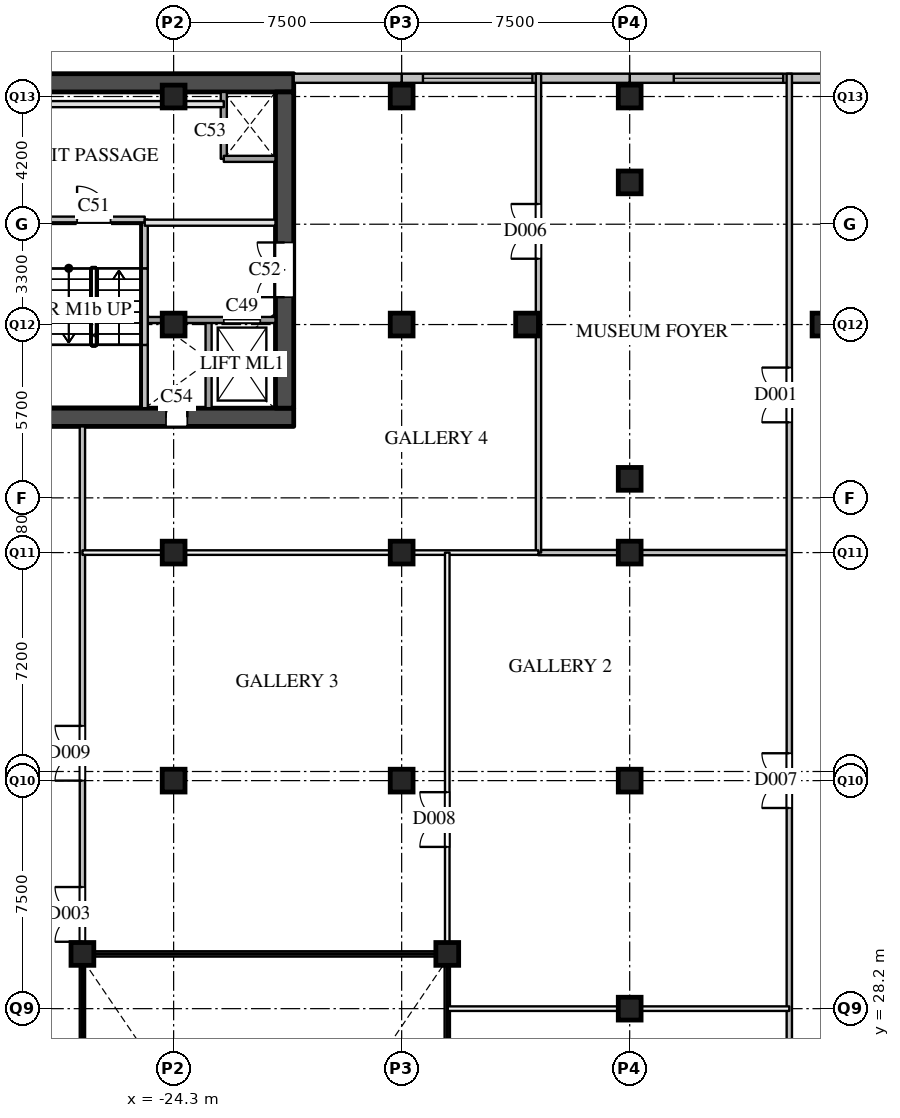
"""IFC4 building model, lengths in metres.
Left out: names, types, materials, properties, quantities, classifications, styles, units other than length and angle.
Written with IfcOpenShell. Run it as: python <this file> out.ifc"""

import sys

from ifc_helpers import new_model, si_unit, direction, frame, frame_2d, origin, origin_2d, place, context, subcontext, project, spatial, rectangle, extrude, element, fill, save


model = new_model("IFC4")
c1 = context("Model", 3, precision=1e-05, world=origin(), true_north=direction((0.0, 1.0)))
c2 = subcontext(c1, "Body", "Model", "MODEL_VIEW")
j1 = project(units=[si_unit("LENGTHUNIT", "METRE"), si_unit("PLANEANGLEUNIT", "RADIAN")], contexts=[c1])
p1 = place(None, origin())
s1 = spatial("IfcSite", under=j1, at=p1, CompositionType="ELEMENT")
p2 = place(p1, origin())
s2 = spatial("IfcBuilding", under=s1, at=p2, CompositionType="ELEMENT")
p3 = place(p2, origin())
s3 = spatial("IfcBuildingStorey", under=s2, at=p3, CompositionType="ELEMENT", Elevation=0.0)
for number, where, z_axis, x_axis in (
    (1, (-24.3, 35.7, 0.0), (0.0, 0.0, 1.0), (1.0, 0.0, 0.0)),
    (2, (-24.3, 43.2, 0.0), (0.0, 0.0, 1.0), (1.0, 0.0, 0.0)),
    (3, (-24.3, 50.7, 0.0), (0.0, 0.0, 1.0), (1.0, 0.0, 0.0)),
    (4, (-24.3, 58.2, 0.0), (0.0, 0.0, 1.0), (1.0, 0.0, 0.0)),
    (5, (-16.8, 35.7, 0.0), (0.0, 0.0, 1.0), (1.0, 0.0, 0.0)),
    (6, (-16.8, 43.2, 0.0), (0.0, 0.0, 1.0), (1.0, 0.0, 0.0)),
    (7, (-16.8, 50.7, 0.0), (0.0, 0.0, 1.0), (1.0, 0.0, 0.0)),
    (8, (-16.8, 58.2, 0.0), (0.0, 0.0, 1.0), (1.0, 0.0, 0.0)),
    (9, (-9.3, 28.2, 0.0), (0.0, 0.0, 1.0), (1.0, 0.0, 0.0)),
    (10, (-9.3, 35.7, 0.0), (0.0, 0.0, 1.0), (1.0, 0.0, 0.0)),
    (11, (-9.3, 43.2, 0.0), (0.0, 0.0, 1.0), (1.0, 0.0, 0.0)),
    (12, (-9.3, 58.2, 0.0), (0.0, 0.0, 1.0), (1.0, 0.0, 0.0)),
    (13, (-15.3, 30.0, 0.0), (0.0, 0.0, 1.0), (1.0, 0.0, 0.0)),
    (14, (-27.3, 30.0, 0.0), (0.0, 0.0, 1.0), (1.0, 0.0, 0.0)),
    (15, (-12.675, 50.7, 0.0), (0.0, 0.0, 1.0), (1.0, 0.0, 0.0)),
    (16, (-9.3, 45.625, 0.0), (0.0, 0.0, 1.0), (1.0, 0.0, 0.0)),
    (17, (-9.3, 55.375, 0.0), (0.0, 0.0, 1.0), (1.0, 0.0, 0.0)),
    (18, (-2.925, 50.7, 0.0), (0.0, 0.0, 1.0), (1.0, 0.0, 0.0)),
):
    element("IfcColumn", number, at=place(p3, frame(where, z_axis=z_axis, x_axis=x_axis)), inside=s3, PredefinedType="COLUMN", context=c2, shape_type="SweptSolid", body=[
        extrude(rectangle(XDim=0.75, YDim=0.75, at=origin_2d()), origin(), (0.0, 0.0, 1.0), 8.0),
    ])
p4 = place(p3, frame((-1.8, 58.8, 0.0), z_axis=(0.0, 0.0, 1.0), x_axis=(-1.0, 0.0, 0.0)))
e19 = element("IfcWall", 19, at=p4, inside=s3, PredefinedType="SOLIDWALL", context=c2, shape_type="SweptSolid", body=[
    extrude(rectangle(XDim=7.5, YDim=0.3, at=frame_2d((3.75, 0.0))), origin(), (0.0, 0.0, 1.0), 7.59),
])
p5 = place(p4, frame((2.45, 0.0, 0.9)))
e20 = element("IfcOpeningElement", 20, at=p5, cuts=e19, PredefinedType="OPENING", context=c2, shape_type="SweptSolid", body=[
    extrude(rectangle(XDim=3.6, YDim=3.0, at=frame_2d((1.8, 1.5))), frame((0.0, 0.16, 0.0), z_axis=(0.0, -1.0, 0.0), x_axis=(1.0, 0.0, 0.0)), (0.0, 0.0, 1.0), 0.32),
])
p6 = place(p3, frame((-9.3, 58.8, 0.0), z_axis=(0.0, 0.0, 1.0), x_axis=(-1.0, 0.0, 0.0)))
e21 = element("IfcWall", 21, at=p6, inside=s3, PredefinedType="SOLIDWALL", context=c2, shape_type="SweptSolid", body=[
    extrude(rectangle(XDim=7.5, YDim=0.3, at=frame_2d((3.75, 0.0))), origin(), (0.0, 0.0, 1.0), 7.59),
])
p7 = place(p6, frame((3.2, 0.0, 0.9)))
e22 = element("IfcOpeningElement", 22, at=p7, cuts=e21, PredefinedType="OPENING", context=c2, shape_type="SweptSolid", body=[
    extrude(rectangle(XDim=3.6, YDim=3.0, at=frame_2d((1.8, 1.5))), frame((0.0, 0.16, 0.0), z_axis=(0.0, -1.0, 0.0), x_axis=(1.0, 0.0, 0.0)), (0.0, 0.0, 1.0), 0.32),
])
p8 = place(p3, frame((-16.8, 58.8, 0.0), z_axis=(0.0, 0.0, 1.0), x_axis=(-1.0, 0.0, 0.0)))
e23 = element("IfcWall", 23, at=p8, inside=s3, PredefinedType="SOLIDWALL", context=c2, shape_type="SweptSolid", body=[
    extrude(rectangle(XDim=3.55, YDim=0.3, at=frame_2d((1.775, 0.0))), origin(), (0.0, 0.0, 1.0), 7.59),
])
p9 = place(p3, frame((-32.55, 47.65, 0.0), z_axis=(0.0, 0.0, 1.0), x_axis=(1.0, 0.0, 0.0)))
e24 = element("IfcWall", 24, at=p9, inside=s3, PredefinedType="SHEAR", context=c2, shape_type="SweptSolid", body=[
    extrude(rectangle(XDim=12.2, YDim=0.6, at=frame_2d((6.1, 0.0))), origin(), (0.0, 0.0, 1.0), 7.59),
])
p10 = place(p9, frame((8.0, 0.0, 0.0)))
e25 = element("IfcOpeningElement", 25, at=p10, cuts=e24, PredefinedType="OPENING", context=c2, shape_type="SweptSolid", body=[
    extrude(rectangle(XDim=0.7, YDim=2.1, at=frame_2d((0.35, 1.05))), frame((0.0, 0.31, 0.0), z_axis=(0.0, -1.0, 0.0), x_axis=(1.0, 0.0, 0.0)), (0.0, 0.0, 1.0), 0.62),
])
p11 = place(p3, frame((-32.55, 58.65, 0.0), z_axis=(0.0, 0.0, 1.0), x_axis=(1.0, 0.0, 0.0)))
e26 = element("IfcWall", 26, at=p11, inside=s3, PredefinedType="SHEAR", context=c2, shape_type="SweptSolid", body=[
    extrude(rectangle(XDim=12.2, YDim=0.6, at=frame_2d((6.1, 0.0))), origin(), (0.0, 0.0, 1.0), 7.59),
])
p12 = place(p3, frame((-20.65, 47.95, 0.0), z_axis=(0.0, 0.0, 1.0), x_axis=(0.0, 1.0, 0.0)))
e27 = element("IfcWall", 27, at=p12, inside=s3, PredefinedType="SHEAR", context=c2, shape_type="SweptSolid", body=[
    extrude(rectangle(XDim=10.4, YDim=0.6, at=frame_2d((5.2, 0.0))), origin(), (0.0, 0.0, 1.0), 7.59),
])
p13 = place(p12, frame((3.65, 0.0, 0.0)))
e28 = element("IfcOpeningElement", 28, at=p13, cuts=e27, PredefinedType="OPENING", context=c2, shape_type="SweptSolid", body=[
    extrude(rectangle(XDim=1.8, YDim=2.1, at=frame_2d((0.9, 1.05))), frame((0.0, 0.31, 0.0), z_axis=(0.0, -1.0, 0.0), x_axis=(1.0, 0.0, 0.0)), (0.0, 0.0, 1.0), 0.62),
])
p14 = place(p3, frame((-25.25, 47.95, 0.0), z_axis=(0.0, 0.0, 1.0), x_axis=(0.0, 1.0, 0.0)))
e29 = element("IfcWall", 29, at=p14, inside=s3, PredefinedType="SOLIDWALL", context=c2, shape_type="SweptSolid", body=[
    extrude(rectangle(XDim=2.08, YDim=0.2, at=frame_2d((1.04, 0.0))), origin(), (0.0, 0.0, 1.0), 7.59),
])
p15 = place(p3, frame((-25.25, 50.03, 0.0), z_axis=(0.0, 0.0, 1.0), x_axis=(0.0, 1.0, 0.0)))
e30 = element("IfcWall", 30, at=p15, inside=s3, PredefinedType="SOLIDWALL", context=c2, shape_type="SweptSolid", body=[
    extrude(rectangle(XDim=2.52, YDim=0.2, at=frame_2d((1.26, 0.0))), origin(), (0.0, 0.0, 1.0), 7.59),
])
p16 = place(p3, frame((-25.25, 52.55, 0.0), z_axis=(0.0, 0.0, 1.0), x_axis=(0.0, 1.0, 0.0)))
e31 = element("IfcWall", 31, at=p16, inside=s3, PredefinedType="SOLIDWALL", context=c2, shape_type="SweptSolid", body=[
    extrude(rectangle(XDim=1.6, YDim=0.2, at=frame_2d((0.8, 0.0))), origin(), (0.0, 0.0, 1.0), 7.59),
])
p17 = place(p3, frame((-23.15, 47.95, 0.0), z_axis=(0.0, 0.0, 1.0), x_axis=(0.0, 1.0, 0.0)))
e32 = element("IfcWall", 32, at=p17, inside=s3, PredefinedType="SOLIDWALL", context=c2, shape_type="SweptSolid", body=[
    extrude(rectangle(XDim=2.9, YDim=0.2, at=frame_2d((1.45, 0.0))), origin(), (0.0, 0.0, 1.0), 7.59),
])
p18 = place(p3, frame((-22.65, 56.15, 0.0), z_axis=(0.0, 0.0, 1.0), x_axis=(0.0, 1.0, 0.0)))
e33 = element("IfcWall", 33, at=p18, inside=s3, PredefinedType="SOLIDWALL", context=c2, shape_type="SweptSolid", body=[
    extrude(rectangle(XDim=2.2, YDim=0.2, at=frame_2d((1.1, 0.0))), origin(), (0.0, 0.0, 1.0), 7.59),
])
p19 = place(p18, frame((0.55, 0.0, 0.0)))
e34 = element("IfcOpeningElement", 34, at=p19, cuts=e33, PredefinedType="OPENING", context=c2, shape_type="SweptSolid", body=[
    extrude(rectangle(XDim=0.7, YDim=2.1, at=frame_2d((0.35, 1.05))), frame((0.0, 0.11, 0.0), z_axis=(0.0, -1.0, 0.0), x_axis=(1.0, 0.0, 0.0)), (0.0, 0.0, 1.0), 0.22),
])
p20 = place(p3, frame((-25.25, 50.85, 0.0), z_axis=(0.0, 0.0, 1.0), x_axis=(1.0, 0.0, 0.0)))
e35 = element("IfcWall", 35, at=p20, inside=s3, PredefinedType="SOLIDWALL", context=c2, shape_type="SweptSolid", body=[
    extrude(rectangle(XDim=4.3, YDim=0.2, at=frame_2d((2.15, 0.0))), origin(), (0.0, 0.0, 1.0), 7.59),
])
p21 = place(p20, frame((2.6, 0.0, 0.0)))
e36 = element("IfcOpeningElement", 36, at=p21, cuts=e35, PredefinedType="OPENING", context=c2, shape_type="SweptSolid", body=[
    extrude(rectangle(XDim=1.2, YDim=2.1, at=frame_2d((0.6, 1.05))), frame((0.0, 0.11, 0.0), z_axis=(0.0, -1.0, 0.0), x_axis=(1.0, 0.0, 0.0)), (0.0, 0.0, 1.0), 0.22),
])
p22 = place(p3, frame((-25.25, 54.05, 0.0), z_axis=(0.0, 0.0, 1.0), x_axis=(1.0, 0.0, 0.0)))
e37 = element("IfcWall", 37, at=p22, inside=s3, PredefinedType="PARTITIONING", context=c2, shape_type="SweptSolid", body=[
    extrude(rectangle(XDim=4.3, YDim=0.2, at=frame_2d((2.15, 0.0))), origin(), (0.0, 0.0, 1.0), 7.59),
])
p23 = place(p3, frame((-28.5, 54.15, 0.0), z_axis=(0.0, 0.0, 1.0), x_axis=(1.0, 0.0, 0.0)))
e38 = element("IfcWall", 38, at=p23, inside=s3, PredefinedType="SOLIDWALL", context=c2, shape_type="SweptSolid", body=[
    extrude(rectangle(XDim=3.25, YDim=0.2, at=frame_2d((1.625, 0.0))), origin(), (0.0, 0.0, 1.0), 7.59),
])
p24 = place(p23, frame((1.025, 0.0, 0.0)))
e39 = element("IfcOpeningElement", 39, at=p24, cuts=e38, PredefinedType="OPENING", context=c2, shape_type="SweptSolid", body=[
    extrude(rectangle(XDim=1.1, YDim=2.1, at=frame_2d((0.55, 1.05))), frame((0.0, 0.11, 0.0), z_axis=(0.0, -1.0, 0.0), x_axis=(1.0, 0.0, 0.0)), (0.0, 0.0, 1.0), 0.22),
])
p25 = place(p3, frame((-22.65, 56.15, 0.0), z_axis=(0.0, 0.0, 1.0), x_axis=(1.0, 0.0, 0.0)))
e40 = element("IfcWall", 40, at=p25, inside=s3, PredefinedType="SOLIDWALL", context=c2, shape_type="SweptSolid", body=[
    extrude(rectangle(XDim=1.7, YDim=0.2, at=frame_2d((0.85, 0.0))), origin(), (0.0, 0.0, 1.0), 7.59),
])
p26 = place(p3, frame((-31.95, 57.95, 0.0), z_axis=(0.0, 0.0, 1.0), x_axis=(1.0, 0.0, 0.0)))
e41 = element("IfcWall", 41, at=p26, inside=s3, PredefinedType="PARTITIONING", context=c2, shape_type="SweptSolid", body=[
    extrude(rectangle(XDim=9.3, YDim=0.2, at=frame_2d((4.65, 0.0))), origin(), (0.0, 0.0, 1.0), 7.59),
])
p27 = place(p3, frame((-27.3, 30.0, 0.0), z_axis=(0.0, 0.0, 1.0), x_axis=(1.0, 0.0, 0.0)))
e42 = element("IfcWall", 42, at=p27, inside=s3, PredefinedType="PARTITIONING", context=c2, shape_type="SweptSolid", body=[
    extrude(rectangle(XDim=12.0, YDim=0.175, at=frame_2d((6.0, 0.0))), origin(), (0.0, 0.0, 1.0), 7.59),
])
p28 = place(p3, frame((-12.3, 43.2, 0.0), z_axis=(0.0, 0.0, 1.0), x_axis=(1.0, 0.0, 0.0)))
e43 = element("IfcWall", 43, at=p28, inside=s3, PredefinedType="PARTITIONING", context=c2, shape_type="SweptSolid", body=[
    extrude(rectangle(XDim=8.25, YDim=0.175, at=frame_2d((4.125, 0.0))), origin(), (0.0, 0.0, 1.0), 6.79),
])
p29 = place(p3, frame((-27.3, 12.0, 0.0), z_axis=(0.0, 0.0, 1.0), x_axis=(0.0, 1.0, 0.0)))
e44 = element("IfcWall", 44, at=p29, inside=s3, PredefinedType="PARTITIONING", context=c2, shape_type="SweptSolid", body=[
    extrude(rectangle(XDim=35.35, YDim=0.175, at=frame_2d((17.675, 0.0))), origin(), (0.0, 0.0, 1.0), 6.79),
])
p30 = place(p29, frame((18.4, 0.0, 0.0)))
e45 = element("IfcOpeningElement", 45, at=p30, cuts=e44, PredefinedType="OPENING", context=c2, shape_type="SweptSolid", body=[
    extrude(rectangle(XDim=1.8, YDim=2.1, at=frame_2d((0.9, 1.05))), frame((0.0, 0.097, 0.0), z_axis=(0.0, -1.0, 0.0), x_axis=(1.0, 0.0, 0.0)), (0.0, 0.0, 1.0), 0.195),
])
p31 = place(p29, frame((23.7, 0.0, 0.0)))
e46 = element("IfcOpeningElement", 46, at=p31, cuts=e44, PredefinedType="OPENING", context=c2, shape_type="SweptSolid", body=[
    extrude(rectangle(XDim=1.8, YDim=2.1, at=frame_2d((0.9, 1.05))), frame((0.0, 0.097, 0.0), z_axis=(0.0, -1.0, 0.0), x_axis=(1.0, 0.0, 0.0)), (0.0, 0.0, 1.0), 0.195),
])
p32 = place(p29, frame((4.688, 0.0, 0.0)))
e47 = element("IfcOpeningElement", 47, at=p32, cuts=e44, PredefinedType="OPENING", context=c2, shape_type="SweptSolid", body=[
    extrude(rectangle(XDim=1.0, YDim=2.1, at=frame_2d((0.5, 1.05))), frame((0.0, 0.097, 0.0), z_axis=(0.0, -1.0, 0.0), x_axis=(1.0, 0.0, 0.0)), (0.0, 0.0, 1.0), 0.195),
])
p33 = place(p3, frame((-15.3, 12.0, 0.0), z_axis=(0.0, 0.0, 1.0), x_axis=(0.0, 1.0, 0.0)))
e48 = element("IfcWall", 48, at=p33, inside=s3, PredefinedType="PARTITIONING", context=c2, shape_type="SweptSolid", body=[
    extrude(rectangle(XDim=18.0, YDim=0.175, at=frame_2d((9.0, 0.0))), origin(), (0.0, 0.0, 1.0), 7.59),
])
p34 = place(p3, frame((-12.3, 43.2, 0.0), z_axis=(0.0, 0.0, 1.0), x_axis=(0.0, 1.0, 0.0)))
e49 = element("IfcWall", 49, at=p34, inside=s3, PredefinedType="PARTITIONING", context=c2, shape_type="SweptSolid", body=[
    extrude(rectangle(XDim=15.75, YDim=0.175, at=frame_2d((7.875, 0.0))), origin(), (0.0, 0.0, 1.0), 6.79),
])
p35 = place(p34, frame((9.665, 0.0, 0.0)))
e50 = element("IfcOpeningElement", 50, at=p35, cuts=e49, PredefinedType="OPENING", context=c2, shape_type="SweptSolid", body=[
    extrude(rectangle(XDim=1.8, YDim=2.1, at=frame_2d((0.9, 1.05))), frame((0.0, 0.097, 0.0), z_axis=(0.0, -1.0, 0.0), x_axis=(1.0, 0.0, 0.0)), (0.0, 0.0, 1.0), 0.195),
])
p36 = place(p3, frame((-4.05, -4.05, 0.0), z_axis=(0.0, 0.0, 1.0), x_axis=(0.0, 1.0, 0.0)))
e51 = element("IfcWall", 51, at=p36, inside=s3, PredefinedType="PARTITIONING", context=c2, shape_type="SweptSolid", body=[
    extrude(rectangle(XDim=63.0, YDim=0.175, at=frame_2d((31.5, 0.0))), origin(), (0.0, 0.0, 1.0), 6.79),
])
p37 = place(p36, frame((51.535, 0.0, 0.0)))
e52 = element("IfcOpeningElement", 52, at=p37, cuts=e51, PredefinedType="OPENING", context=c2, shape_type="SweptSolid", body=[
    extrude(rectangle(XDim=1.8, YDim=2.1, at=frame_2d((0.9, 1.05))), frame((0.0, 0.097, 0.0), z_axis=(0.0, -1.0, 0.0), x_axis=(1.0, 0.0, 0.0)), (0.0, 0.0, 1.0), 0.195),
])
p38 = place(p36, frame((23.25, 0.0, 0.0)))
e53 = element("IfcOpeningElement", 53, at=p38, cuts=e51, PredefinedType="OPENING", context=c2, shape_type="SweptSolid", body=[
    extrude(rectangle(XDim=1.8, YDim=2.1, at=frame_2d((0.9, 1.05))), frame((0.0, 0.097, 0.0), z_axis=(0.0, -1.0, 0.0), x_axis=(1.0, 0.0, 0.0)), (0.0, 0.0, 1.0), 0.195),
])
p39 = place(p36, frame((38.85, 0.0, 0.0)))
e54 = element("IfcOpeningElement", 54, at=p39, cuts=e51, PredefinedType="OPENING", context=c2, shape_type="SweptSolid", body=[
    extrude(rectangle(XDim=1.8, YDim=2.1, at=frame_2d((0.9, 1.05))), frame((0.0, 0.097, 0.0), z_axis=(0.0, -1.0, 0.0), x_axis=(1.0, 0.0, 0.0)), (0.0, 0.0, 1.0), 0.195),
])
p40 = place(p36, frame((8.625, 0.0, 0.0)))
e55 = element("IfcOpeningElement", 55, at=p40, cuts=e51, PredefinedType="OPENING", context=c2, shape_type="SweptSolid", body=[
    extrude(rectangle(XDim=1.8, YDim=2.1, at=frame_2d((0.9, 1.05))), frame((0.0, 0.097, 0.0), z_axis=(0.0, -1.0, 0.0), x_axis=(1.0, 0.0, 0.0)), (0.0, 0.0, 1.0), 0.195),
])
p41 = place(p3, frame((-15.3, 28.2, 0.0), z_axis=(0.0, 0.0, 1.0), x_axis=(1.0, 0.0, 0.0)))
e56 = element("IfcWall", 56, at=p41, inside=s3, PredefinedType="PARTITIONING", context=c2, shape_type="SweptSolid", body=[
    extrude(rectangle(XDim=11.25, YDim=0.15, at=frame_2d((5.625, 0.0))), origin(), (0.0, 0.0, 1.0), 6.79),
])
p42 = place(p3, frame((-27.3, 43.2, 0.0), z_axis=(0.0, 0.0, 1.0), x_axis=(1.0, 0.0, 0.0)))
e57 = element("IfcWall", 57, at=p42, inside=s3, PredefinedType="PARTITIONING", context=c2, shape_type="SweptSolid", body=[
    extrude(rectangle(XDim=15.0, YDim=0.15, at=frame_2d((7.5, 0.0))), origin(), (0.0, 0.0, 1.0), 6.79),
])
p43 = place(p3, frame((-15.3, 30.0, 0.0), z_axis=(0.0, 0.0, 1.0), x_axis=(0.0, 1.0, 0.0)))
e58 = element("IfcWall", 58, at=p43, inside=s3, PredefinedType="PARTITIONING", context=c2, shape_type="SweptSolid", body=[
    extrude(rectangle(XDim=13.2, YDim=0.15, at=frame_2d((6.6, 0.0))), origin(), (0.0, 0.0, 1.0), 6.79),
])
p44 = place(p43, frame((3.52, 0.0, 0.0)))
e59 = element("IfcOpeningElement", 59, at=p44, cuts=e58, PredefinedType="OPENING", context=c2, shape_type="SweptSolid", body=[
    extrude(rectangle(XDim=1.8, YDim=2.1, at=frame_2d((0.9, 1.05))), frame((0.0, 0.085, 0.0), z_axis=(0.0, -1.0, 0.0), x_axis=(1.0, 0.0, 0.0)), (0.0, 0.0, 1.0), 0.17),
])
p45 = place(p5, origin())
e60 = element("IfcWindow", 60, at=p45, inside=s3, PartitioningType="SINGLE_PANEL", PredefinedType="WINDOW", context=c2, shape_type="SweptSolid", body=[
    extrude(rectangle(XDim=3.6, YDim=3.0, at=frame_2d((1.8, 1.5))), frame((0.0, 0.03, 0.0), z_axis=(0.0, -1.0, 0.0), x_axis=(1.0, 0.0, 0.0)), (0.0, 0.0, 1.0), 0.06),
])
fill(e20, e60)
p46 = place(p7, origin())
e61 = element("IfcWindow", 61, at=p46, inside=s3, PartitioningType="SINGLE_PANEL", PredefinedType="WINDOW", context=c2, shape_type="SweptSolid", body=[
    extrude(rectangle(XDim=3.6, YDim=3.0, at=frame_2d((1.8, 1.5))), frame((0.0, 0.03, 0.0), z_axis=(0.0, -1.0, 0.0), x_axis=(1.0, 0.0, 0.0)), (0.0, 0.0, 1.0), 0.06),
])
fill(e22, e61)
p47 = place(p21, origin())
e62 = element("IfcDoor", 62, at=p47, inside=s3, OperationType="SLIDING_TO_LEFT", PredefinedType="DOOR", context=c2, shape_type="SweptSolid", body=[
    extrude(rectangle(XDim=1.2, YDim=2.1, at=frame_2d((0.6, 1.05))), frame((0.0, 0.025, 0.0), z_axis=(0.0, -1.0, 0.0), x_axis=(1.0, 0.0, 0.0)), (0.0, 0.0, 1.0), 0.05),
])
fill(e36, e62)
p48 = place(p24, origin())
e63 = element("IfcDoor", 63, at=p48, inside=s3, OperationType="SINGLE_SWING_LEFT", PredefinedType="DOOR", context=c2, shape_type="SweptSolid", body=[
    extrude(rectangle(XDim=1.1, YDim=2.1, at=frame_2d((0.55, 1.05))), frame((0.0, 0.025, 0.0), z_axis=(0.0, -1.0, 0.0), x_axis=(1.0, 0.0, 0.0)), (0.0, 0.0, 1.0), 0.05),
])
fill(e39, e63)
p49 = place(p13, origin())
e64 = element("IfcDoor", 64, at=p49, inside=s3, OperationType="DOUBLE_DOOR_SINGLE_SWING", PredefinedType="DOOR", context=c2, shape_type="SweptSolid", body=[
    extrude(rectangle(XDim=1.8, YDim=2.1, at=frame_2d((0.9, 1.05))), frame((0.0, 0.025, 0.0), z_axis=(0.0, -1.0, 0.0), x_axis=(1.0, 0.0, 0.0)), (0.0, 0.0, 1.0), 0.05),
])
fill(e28, e64)
p50 = place(p19, origin())
e65 = element("IfcDoor", 65, at=p50, inside=s3, OperationType="SINGLE_SWING_LEFT", PredefinedType="DOOR", context=c2, shape_type="SweptSolid", body=[
    extrude(rectangle(XDim=0.7, YDim=2.1, at=frame_2d((0.35, 1.05))), frame((0.0, 0.025, 0.0), z_axis=(0.0, -1.0, 0.0), x_axis=(1.0, 0.0, 0.0)), (0.0, 0.0, 1.0), 0.05),
])
fill(e34, e65)
p51 = place(p10, origin())
e66 = element("IfcDoor", 66, at=p51, inside=s3, OperationType="SINGLE_SWING_RIGHT", PredefinedType="DOOR", context=c2, shape_type="SweptSolid", body=[
    extrude(rectangle(XDim=0.7, YDim=2.1, at=frame_2d((0.35, 1.05))), frame((0.0, 0.025, 0.0), z_axis=(0.0, -1.0, 0.0), x_axis=(1.0, 0.0, 0.0)), (0.0, 0.0, 1.0), 0.05),
])
fill(e25, e66)
p52 = place(p37, origin())
e67 = element("IfcDoor", 67, at=p52, inside=s3, OperationType="DOUBLE_DOOR_SINGLE_SWING", PredefinedType="DOOR", context=c2, shape_type="SweptSolid", body=[
    extrude(rectangle(XDim=1.8, YDim=2.1, at=frame_2d((0.9, 1.05))), frame((0.0, 0.025, 0.0), z_axis=(0.0, -1.0, 0.0), x_axis=(1.0, 0.0, 0.0)), (0.0, 0.0, 1.0), 0.05),
])
fill(e52, e67)
p53 = place(p30, origin())
e68 = element("IfcDoor", 68, at=p53, inside=s3, OperationType="DOUBLE_DOOR_SINGLE_SWING", PredefinedType="DOOR", context=c2, shape_type="SweptSolid", body=[
    extrude(rectangle(XDim=1.8, YDim=2.1, at=frame_2d((0.9, 1.05))), frame((0.0, 0.025, 0.0), z_axis=(0.0, -1.0, 0.0), x_axis=(1.0, 0.0, 0.0)), (0.0, 0.0, 1.0), 0.05),
])
fill(e45, e68)
p54 = place(p35, origin())
e69 = element("IfcDoor", 69, at=p54, inside=s3, OperationType="DOUBLE_DOOR_SINGLE_SWING", PredefinedType="DOOR", context=c2, shape_type="SweptSolid", body=[
    extrude(rectangle(XDim=1.8, YDim=2.1, at=frame_2d((0.9, 1.05))), frame((0.0, 0.025, 0.0), z_axis=(0.0, -1.0, 0.0), x_axis=(1.0, 0.0, 0.0)), (0.0, 0.0, 1.0), 0.05),
])
fill(e50, e69)
p55 = place(p39, origin())
e70 = element("IfcDoor", 70, at=p55, inside=s3, OperationType="DOUBLE_DOOR_SINGLE_SWING", PredefinedType="DOOR", context=c2, shape_type="SweptSolid", body=[
    extrude(rectangle(XDim=1.8, YDim=2.1, at=frame_2d((0.9, 1.05))), frame((0.0, 0.025, 0.0), z_axis=(0.0, -1.0, 0.0), x_axis=(1.0, 0.0, 0.0)), (0.0, 0.0, 1.0), 0.05),
])
fill(e54, e70)
p56 = place(p44, origin())
e71 = element("IfcDoor", 71, at=p56, inside=s3, OperationType="DOUBLE_DOOR_SINGLE_SWING", PredefinedType="DOOR", context=c2, shape_type="SweptSolid", body=[
    extrude(rectangle(XDim=1.8, YDim=2.1, at=frame_2d((0.9, 1.05))), frame((0.0, 0.025, 0.0), z_axis=(0.0, -1.0, 0.0), x_axis=(1.0, 0.0, 0.0)), (0.0, 0.0, 1.0), 0.05),
])
fill(e59, e71)
p57 = place(p31, origin())
e72 = element("IfcDoor", 72, at=p57, inside=s3, OperationType="DOUBLE_DOOR_SINGLE_SWING", PredefinedType="DOOR", context=c2, shape_type="SweptSolid", body=[
    extrude(rectangle(XDim=1.8, YDim=2.1, at=frame_2d((0.9, 1.05))), frame((0.0, 0.025, 0.0), z_axis=(0.0, -1.0, 0.0), x_axis=(1.0, 0.0, 0.0)), (0.0, 0.0, 1.0), 0.05),
])
fill(e46, e72)
save(model, sys.argv[1])
